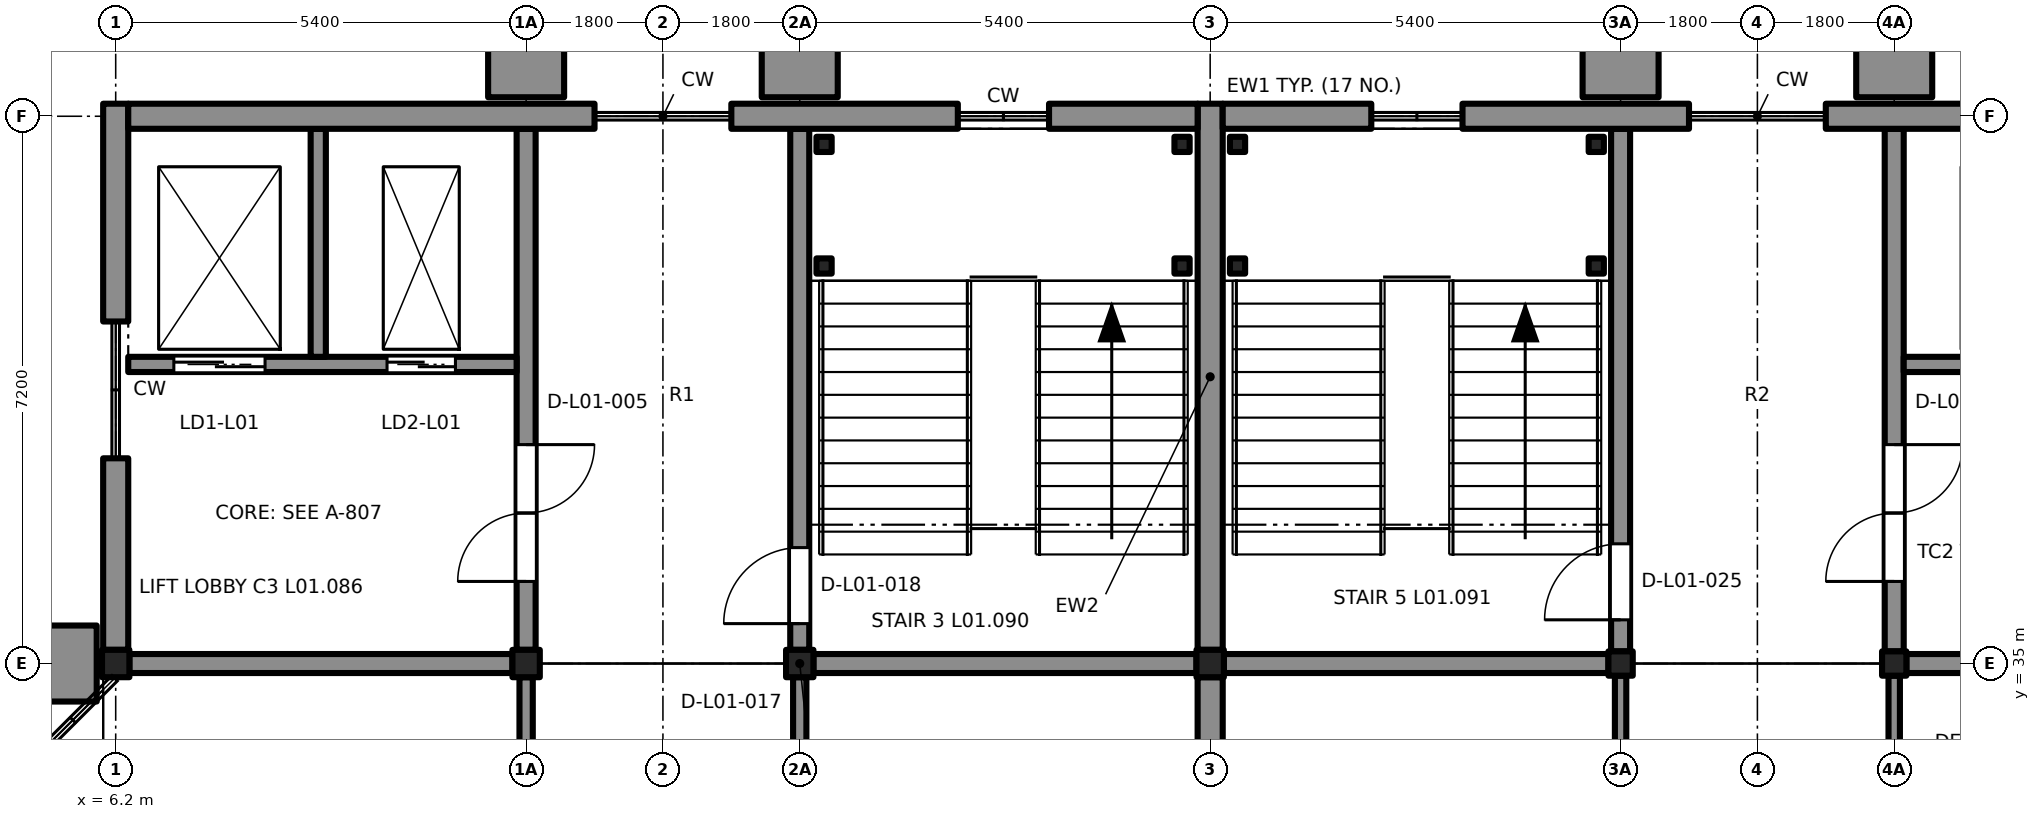
"""IFC4 building model, lengths in metres.
Left out: names, types, materials, properties, quantities, classifications, styles, units other than length and angle.
Written with IfcOpenShell. Run it as: python <this file> out.ifc"""

import sys

from ifc_helpers import new_model, si_unit, direction, frame, frame_2d, origin, origin_2d, place, context, subcontext, project, spatial, rectangle, extrude, element, fill, save


model = new_model("IFC4")
c1 = context("Model", 3, precision=1e-05, world=origin(), true_north=direction((0.0, 1.0)))
c2 = subcontext(c1, "Body", "Model", "MODEL_VIEW")
j1 = project(units=[si_unit("LENGTHUNIT", "METRE"), si_unit("PLANEANGLEUNIT", "RADIAN")], contexts=[c1])
p1 = place(None, origin())
s1 = spatial("IfcSite", under=j1, at=p1, CompositionType="ELEMENT")
p2 = place(p1, origin())
s2 = spatial("IfcBuilding", under=s1, at=p2, CompositionType="ELEMENT")
p3 = place(p2, frame((0.0, 0.0, 6.3)))
s3 = spatial("IfcBuildingStorey", under=s2, at=p3, CompositionType="ELEMENT", Elevation=6.3)
for number, where, z_axis, x_axis in (
    (1, (6.2, 35.0, 0.0), (0.0, 0.0, 1.0), (1.0, 0.0, 0.0)),
    (2, (11.6, 35.0, 0.0), (0.0, 0.0, 1.0), (1.0, 0.0, 0.0)),
    (3, (15.2, 35.0, 0.0), (0.0, 0.0, 1.0), (1.0, 0.0, 0.0)),
    (4, (20.6, 35.0, 0.0), (0.0, 0.0, 1.0), (1.0, 0.0, 0.0)),
):
    element("IfcColumn", number, at=place(p3, frame(where, z_axis=z_axis, x_axis=x_axis)), inside=s3, PredefinedType="COLUMN", context=c2, shape_type="SweptSolid", body=[
        extrude(rectangle(XDim=0.36, YDim=0.36, at=origin_2d()), origin(), (0.0, 0.0, 1.0), 3.9),
    ])
for number, where, z_axis, x_axis in (
    (5, (26.0, 35.0, 0.0), (0.0, 0.0, 1.0), (1.0, 0.0, 0.0)),
    (6, (29.6, 35.0, 0.0), (0.0, 0.0, 1.0), (1.0, 0.0, 0.0)),
):
    element("IfcColumn", number, at=place(p3, frame(where, z_axis=z_axis, x_axis=x_axis)), inside=s3, PredefinedType="COLUMN", context=c2, shape_type="SweptSolid", body=[
        extrude(rectangle(XDim=0.32, YDim=0.32, at=origin_2d()), origin(), (0.0, 0.0, 1.0), 3.9),
    ])
p4 = place(p3, frame((15.2, 35.18, 0.0), z_axis=(0.0, 0.0, 1.0), x_axis=(0.0, 1.0, 0.0)))
e7 = element("IfcWall", 7, at=p4, inside=s3, PredefinedType="SHEAR", context=c2, shape_type="SweptSolid", body=[
    extrude(rectangle(XDim=6.855, YDim=0.25, at=frame_2d((3.427, 0.0))), origin(), (0.0, 0.0, 1.0), 3.65),
])
p5 = place(p4, frame((0.345, 0.0, 0.0)))
e8 = element("IfcOpeningElement", 8, at=p5, cuts=e7, PredefinedType="OPENING", context=c2, shape_type="SweptSolid", body=[
    extrude(rectangle(XDim=1.0, YDim=2.1, at=frame_2d((0.5, 1.05))), frame((0.0, 0.135, 0.0), z_axis=(0.0, -1.0, 0.0), x_axis=(1.0, 0.0, 0.0)), (0.0, 0.0, 1.0), 0.27),
])
p6 = place(p3, frame((15.38, 35.0, 0.0), z_axis=(0.0, 0.0, 1.0), x_axis=(1.0, 0.0, 0.0)))
e9 = element("IfcWall", 9, at=p6, inside=s3, PredefinedType="SHEAR", context=c2, shape_type="SweptSolid", body=[
    extrude(rectangle(XDim=5.04, YDim=0.25, at=frame_2d((2.52, 0.0))), origin(), (0.0, 0.0, 1.0), 3.65),
])
p7 = place(p3, frame((11.6, 35.18, 0.0), z_axis=(0.0, 0.0, 1.0), x_axis=(0.0, 1.0, 0.0)))
e10 = element("IfcWall", 10, at=p7, inside=s3, PredefinedType="SHEAR", context=c2, shape_type="SweptSolid", body=[
    extrude(rectangle(XDim=6.855, YDim=0.25, at=frame_2d((3.427, 0.0))), origin(), (0.0, 0.0, 1.0), 3.65),
])
p8 = place(p7, frame((0.9, 0.0, 0.0)))
e11 = element("IfcOpeningElement", 11, at=p8, cuts=e10, PredefinedType="OPENING", context=c2, shape_type="SweptSolid", body=[
    extrude(rectangle(XDim=1.8, YDim=2.1, at=frame_2d((0.9, 1.05))), frame((0.0, 0.135, 0.0), z_axis=(0.0, -1.0, 0.0), x_axis=(1.0, 0.0, 0.0)), (0.0, 0.0, 1.0), 0.27),
])
p9 = place(p3, frame((6.38, 35.0, 0.0), z_axis=(0.0, 0.0, 1.0), x_axis=(1.0, 0.0, 0.0)))
e12 = element("IfcWall", 12, at=p9, inside=s3, PredefinedType="SHEAR", context=c2, shape_type="SweptSolid", body=[
    extrude(rectangle(XDim=5.04, YDim=0.25, at=frame_2d((2.52, 0.0))), origin(), (0.0, 0.0, 1.0), 3.65),
])
p10 = place(p3, frame((6.365, 38.935, 0.0), z_axis=(0.0, 0.0, 1.0), x_axis=(1.0, 0.0, 0.0)))
e13 = element("IfcWall", 13, at=p10, inside=s3, PredefinedType="SHEAR", context=c2, shape_type="SweptSolid", body=[
    extrude(rectangle(XDim=5.11, YDim=0.2, at=frame_2d((2.555, 0.0))), origin(), (0.0, 0.0, 1.0), 3.65),
])
p11 = place(p10, frame((0.6, 0.0, 0.0)))
e14 = element("IfcOpeningElement", 14, at=p11, cuts=e13, PredefinedType="OPENING", context=c2, shape_type="SweptSolid", body=[
    extrude(rectangle(XDim=1.2, YDim=2.1, at=frame_2d((0.6, 1.05))), frame((0.0, 0.11, 0.0), z_axis=(0.0, -1.0, 0.0), x_axis=(1.0, 0.0, 0.0)), (0.0, 0.0, 1.0), 0.22),
])
p12 = place(p10, frame((3.405, 0.0, 0.0)))
e15 = element("IfcOpeningElement", 15, at=p12, cuts=e13, PredefinedType="OPENING", context=c2, shape_type="SweptSolid", body=[
    extrude(rectangle(XDim=0.9, YDim=2.1, at=frame_2d((0.45, 1.05))), frame((0.0, 0.11, 0.0), z_axis=(0.0, -1.0, 0.0), x_axis=(1.0, 0.0, 0.0)), (0.0, 0.0, 1.0), 0.22),
])
p13 = place(p3, frame((8.865, 42.035, 0.0), z_axis=(0.0, 0.0, 1.0), x_axis=(0.0, -1.0, 0.0)))
e16 = element("IfcWall", 16, at=p13, inside=s3, PredefinedType="SHEAR", context=c2, shape_type="SweptSolid", body=[
    extrude(rectangle(XDim=3.0, YDim=0.2, at=frame_2d((1.5, 0.0))), origin(), (0.0, 0.0, 1.0), 3.65),
])
for number, where, z_axis, x_axis in (
    (17, (15.52, 41.83, 0.0), (0.0, 0.0, 1.0), (1.0, 0.0, 0.0)),
    (18, (20.23, 41.83, 0.0), (0.0, 0.0, 1.0), (1.0, 0.0, 0.0)),
    (19, (15.52, 40.23, 0.0), (0.0, 0.0, 1.0), (1.0, 0.0, 0.0)),
    (20, (20.23, 40.23, 0.0), (0.0, 0.0, 1.0), (1.0, 0.0, 0.0)),
):
    element("IfcColumn", number, at=place(p3, frame(where, z_axis=z_axis, x_axis=x_axis)), inside=s3, PredefinedType="COLUMN", context=c2, shape_type="SweptSolid", body=[
        extrude(rectangle(XDim=0.2, YDim=0.2, at=origin_2d()), origin(), (0.0, 0.0, 1.0), 3.9),
    ])
p14 = place(p3, frame((26.0, 35.16, 0.0), z_axis=(0.0, 0.0, 1.0), x_axis=(0.0, 1.0, 0.0)))
e21 = element("IfcWall", 21, at=p14, inside=s3, PredefinedType="SHEAR", context=c2, shape_type="SweptSolid", body=[
    extrude(rectangle(XDim=6.875, YDim=0.25, at=frame_2d((3.438, 0.0))), origin(), (0.0, 0.0, 1.0), 3.65),
])
p15 = place(p14, frame((0.415, 0.0, 0.0)))
e22 = element("IfcOpeningElement", 22, at=p15, cuts=e21, PredefinedType="OPENING", context=c2, shape_type="SweptSolid", body=[
    extrude(rectangle(XDim=1.0, YDim=2.1, at=frame_2d((0.5, 1.05))), frame((0.0, 0.135, 0.0), z_axis=(0.0, -1.0, 0.0), x_axis=(1.0, 0.0, 0.0)), (0.0, 0.0, 1.0), 0.27),
])
p16 = place(p3, frame((20.78, 35.0, 0.0), z_axis=(0.0, 0.0, 1.0), x_axis=(1.0, 0.0, 0.0)))
e23 = element("IfcWall", 23, at=p16, inside=s3, PredefinedType="SHEAR", context=c2, shape_type="SweptSolid", body=[
    extrude(rectangle(XDim=5.06, YDim=0.25, at=frame_2d((2.53, 0.0))), origin(), (0.0, 0.0, 1.0), 3.65),
])
p17 = place(p3, frame((29.6, 35.16, 0.0), z_axis=(0.0, 0.0, 1.0), x_axis=(0.0, 1.0, 0.0)))
e24 = element("IfcWall", 24, at=p17, inside=s3, PredefinedType="SHEAR", context=c2, shape_type="SweptSolid", body=[
    extrude(rectangle(XDim=6.875, YDim=0.25, at=frame_2d((3.438, 0.0))), origin(), (0.0, 0.0, 1.0), 3.65),
])
p18 = place(p17, frame((0.92, 0.0, 0.0)))
e25 = element("IfcOpeningElement", 25, at=p18, cuts=e24, PredefinedType="OPENING", context=c2, shape_type="SweptSolid", body=[
    extrude(rectangle(XDim=1.8, YDim=2.1, at=frame_2d((0.9, 1.05))), frame((0.0, 0.135, 0.0), z_axis=(0.0, -1.0, 0.0), x_axis=(1.0, 0.0, 0.0)), (0.0, 0.0, 1.0), 0.27),
])
p19 = place(p3, frame((29.76, 35.0, 0.0), z_axis=(0.0, 0.0, 1.0), x_axis=(1.0, 0.0, 0.0)))
e26 = element("IfcWall", 26, at=p19, inside=s3, PredefinedType="SHEAR", context=c2, shape_type="SweptSolid", body=[
    extrude(rectangle(XDim=5.08, YDim=0.25, at=frame_2d((2.54, 0.0))), origin(), (0.0, 0.0, 1.0), 3.65),
])
p20 = place(p3, frame((29.725, 38.935, 0.0), z_axis=(0.0, 0.0, 1.0), x_axis=(1.0, 0.0, 0.0)))
e27 = element("IfcWall", 27, at=p20, inside=s3, PredefinedType="SHEAR", context=c2, shape_type="SweptSolid", body=[
    extrude(rectangle(XDim=5.11, YDim=0.2, at=frame_2d((2.555, 0.0))), origin(), (0.0, 0.0, 1.0), 3.65),
])
p21 = place(p20, frame((3.31, 0.0, 0.0)))
e28 = element("IfcOpeningElement", 28, at=p21, cuts=e27, PredefinedType="OPENING", context=c2, shape_type="SweptSolid", body=[
    extrude(rectangle(XDim=1.2, YDim=2.1, at=frame_2d((0.6, 1.05))), frame((0.0, 0.11, 0.0), z_axis=(0.0, -1.0, 0.0), x_axis=(1.0, 0.0, 0.0)), (0.0, 0.0, 1.0), 0.22),
])
p22 = place(p20, frame((0.805, 0.0, 0.0)))
e29 = element("IfcOpeningElement", 29, at=p22, cuts=e27, PredefinedType="OPENING", context=c2, shape_type="SweptSolid", body=[
    extrude(rectangle(XDim=0.9, YDim=2.1, at=frame_2d((0.45, 1.05))), frame((0.0, 0.11, 0.0), z_axis=(0.0, -1.0, 0.0), x_axis=(1.0, 0.0, 0.0)), (0.0, 0.0, 1.0), 0.22),
])
for number, where, z_axis, x_axis in (
    (30, (20.96, 41.83, 0.0), (0.0, 0.0, 1.0), (1.0, 0.0, 0.0)),
    (31, (25.68, 41.83, 0.0), (0.0, 0.0, 1.0), (1.0, 0.0, 0.0)),
    (32, (20.96, 40.23, 0.0), (0.0, 0.0, 1.0), (1.0, 0.0, 0.0)),
    (33, (25.68, 40.23, 0.0), (0.0, 0.0, 1.0), (1.0, 0.0, 0.0)),
):
    element("IfcColumn", number, at=place(p3, frame(where, z_axis=z_axis, x_axis=x_axis)), inside=s3, PredefinedType="COLUMN", context=c2, shape_type="SweptSolid", body=[
        extrude(rectangle(XDim=0.2, YDim=0.2, at=origin_2d()), origin(), (0.0, 0.0, 1.0), 3.9),
    ])
p23 = place(p3, frame((6.2, 35.18, 0.0), z_axis=(0.0, 0.0, 1.0), x_axis=(0.0, 1.0, 0.0)))
e34 = element("IfcWall", 34, at=p23, inside=s3, PredefinedType="SOLIDWALL", context=c2, shape_type="SweptSolid", body=[
    extrude(rectangle(XDim=2.52, YDim=0.33, at=frame_2d((1.26, 0.0))), origin(), (0.0, 0.0, 1.0), 3.22),
])
p24 = place(p3, frame((6.2, 39.5, 0.0), z_axis=(0.0, 0.0, 1.0), x_axis=(0.0, 1.0, 0.0)))
e35 = element("IfcWall", 35, at=p24, inside=s3, PredefinedType="SOLIDWALL", context=c2, shape_type="SweptSolid", body=[
    extrude(rectangle(XDim=2.865, YDim=0.33, at=frame_2d((1.433, 0.0))), origin(), (0.0, 0.0, 1.0), 3.22),
])
p25 = place(p3, frame((5.575, 34.5, 0.0), z_axis=(0.0, 0.0, 1.0), x_axis=(0.0, 1.0, 0.0)))
e36 = element("IfcWall", 36, at=p25, inside=s3, PredefinedType="SOLIDWALL", context=c2, shape_type="SweptSolid", body=[
    extrude(rectangle(XDim=1.0, YDim=0.75, at=frame_2d((0.5, 0.0))), origin(), (0.0, 0.0, 1.0), 3.9),
])
p26 = place(p3, frame((20.6, 34.82, 0.0), z_axis=(0.0, 0.0, 1.0), x_axis=(0.0, -1.0, 0.0)))
e37 = element("IfcWall", 37, at=p26, inside=s3, PredefinedType="SOLIDWALL", context=c2, shape_type="SweptSolid", body=[
    extrude(rectangle(XDim=6.84, YDim=0.33, at=frame_2d((3.42, 0.0))), origin(), (0.0, 0.0, 1.0), 3.22),
])
p27 = place(p3, frame((20.6, 42.365, 0.0), z_axis=(0.0, 0.0, 1.0), x_axis=(0.0, -1.0, 0.0)))
e38 = element("IfcWall", 38, at=p27, inside=s3, PredefinedType="SOLIDWALL", context=c2, shape_type="SweptSolid", body=[
    extrude(rectangle(XDim=7.185, YDim=0.33, at=frame_2d((3.593, 0.0))), origin(), (0.0, 0.0, 1.0), 3.22),
])
p28 = place(p3, frame((6.365, 42.2, 0.0), z_axis=(0.0, 0.0, 1.0), x_axis=(1.0, 0.0, 0.0)))
e39 = element("IfcWall", 39, at=p28, inside=s3, PredefinedType="SOLIDWALL", context=c2, shape_type="SweptSolid", body=[
    extrude(rectangle(XDim=6.135, YDim=0.33, at=frame_2d((3.067, 0.0))), origin(), (0.0, 0.0, 1.0), 3.2),
])
p29 = place(p3, frame((14.3, 42.2, 0.0), z_axis=(0.0, 0.0, 1.0), x_axis=(1.0, 0.0, 0.0)))
e40 = element("IfcWall", 40, at=p29, inside=s3, PredefinedType="SOLIDWALL", context=c2, shape_type="SweptSolid", body=[
    extrude(rectangle(XDim=2.98, YDim=0.33, at=frame_2d((1.49, 0.0))), origin(), (0.0, 0.0, 1.0), 3.2),
])
p30 = place(p3, frame((18.48, 42.2, 0.0), z_axis=(0.0, 0.0, 1.0), x_axis=(1.0, 0.0, 0.0)))
e41 = element("IfcWall", 41, at=p30, inside=s3, PredefinedType="SOLIDWALL", context=c2, shape_type="SweptSolid", body=[
    extrude(rectangle(XDim=1.955, YDim=0.33, at=frame_2d((0.978, 0.0))), origin(), (0.0, 0.0, 1.0), 3.2),
])
for number, where, z_axis, x_axis in (
    (42, (11.1, 42.825, 0.0), (0.0, 0.0, 1.0), (1.0, 0.0, 0.0)),
    (43, (14.7, 42.825, 0.0), (0.0, 0.0, 1.0), (1.0, 0.0, 0.0)),
):
    element("IfcWall", number, at=place(p3, frame(where, z_axis=z_axis, x_axis=x_axis)), inside=s3, PredefinedType="SOLIDWALL", context=c2, shape_type="SweptSolid", body=[
        extrude(rectangle(XDim=1.0, YDim=0.75, at=frame_2d((0.5, 0.0))), origin(), (0.0, 0.0, 1.0), 3.9),
    ])
p31 = place(p3, frame((20.765, 42.2, 0.0), z_axis=(0.0, 0.0, 1.0), x_axis=(1.0, 0.0, 0.0)))
e44 = element("IfcWall", 44, at=p31, inside=s3, PredefinedType="SOLIDWALL", context=c2, shape_type="SweptSolid", body=[
    extrude(rectangle(XDim=1.955, YDim=0.33, at=frame_2d((0.978, 0.0))), origin(), (0.0, 0.0, 1.0), 3.2),
])
p32 = place(p3, frame((23.92, 42.2, 0.0), z_axis=(0.0, 0.0, 1.0), x_axis=(1.0, 0.0, 0.0)))
e45 = element("IfcWall", 45, at=p32, inside=s3, PredefinedType="SOLIDWALL", context=c2, shape_type="SweptSolid", body=[
    extrude(rectangle(XDim=2.98, YDim=0.33, at=frame_2d((1.49, 0.0))), origin(), (0.0, 0.0, 1.0), 3.2),
])
p33 = place(p3, frame((28.7, 42.2, 0.0), z_axis=(0.0, 0.0, 1.0), x_axis=(1.0, 0.0, 0.0)))
e46 = element("IfcWall", 46, at=p33, inside=s3, PredefinedType="SOLIDWALL", context=c2, shape_type="SweptSolid", body=[
    extrude(rectangle(XDim=6.135, YDim=0.33, at=frame_2d((3.067, 0.0))), origin(), (0.0, 0.0, 1.0), 3.2),
])
for number, where, z_axis, x_axis in (
    (47, (25.5, 42.825, 0.0), (0.0, 0.0, 1.0), (1.0, 0.0, 0.0)),
    (48, (29.1, 42.825, 0.0), (0.0, 0.0, 1.0), (1.0, 0.0, 0.0)),
):
    element("IfcWall", number, at=place(p3, frame(where, z_axis=z_axis, x_axis=x_axis)), inside=s3, PredefinedType="SOLIDWALL", context=c2, shape_type="SweptSolid", body=[
        extrude(rectangle(XDim=1.0, YDim=0.75, at=frame_2d((0.5, 0.0))), origin(), (0.0, 0.0, 1.0), 3.9),
    ])
p34 = place(p3, frame((11.6, 27.98, 0.0), z_axis=(0.0, 0.0, 1.0), x_axis=(0.0, 1.0, 0.0)))
e49 = element("IfcWall", 49, at=p34, inside=s3, PredefinedType="PARTITIONING", context=c2, shape_type="SweptSolid", body=[
    extrude(rectangle(XDim=6.84, YDim=0.175, at=frame_2d((3.42, 0.0))), origin(), (0.0, 0.0, 1.0), 3.22),
])
p35 = place(p34, frame((0.62, 0.0, 0.0)))
e50 = element("IfcOpeningElement", 50, at=p35, cuts=e49, PredefinedType="OPENING", context=c2, shape_type="SweptSolid", body=[
    extrude(rectangle(XDim=2.0, YDim=2.4, at=frame_2d((1.0, 1.2))), frame((0.0, 0.097, 0.0), z_axis=(0.0, -1.0, 0.0), x_axis=(1.0, 0.0, 0.0)), (0.0, 0.0, 1.0), 0.195),
])
p36 = place(p3, frame((15.2, 34.82, 0.0), z_axis=(0.0, 0.0, 1.0), x_axis=(0.0, -1.0, 0.0)))
e51 = element("IfcWall", 51, at=p36, inside=s3, PredefinedType="PARTITIONING", context=c2, shape_type="SweptSolid", body=[
    extrude(rectangle(XDim=3.42, YDim=0.175, at=frame_2d((1.71, 0.0))), origin(), (0.0, 0.0, 1.0), 3.22),
])
p37 = place(p36, frame((0.87, 0.0, 0.0)))
e52 = element("IfcOpeningElement", 52, at=p37, cuts=e51, PredefinedType="OPENING", context=c2, shape_type="SweptSolid", body=[
    extrude(rectangle(XDim=1.5, YDim=2.1, at=frame_2d((0.75, 1.05))), frame((0.0, 0.097, 0.0), z_axis=(0.0, -1.0, 0.0), x_axis=(1.0, 0.0, 0.0)), (0.0, 0.0, 1.0), 0.195),
])
p38 = place(p3, frame((26.0, 31.4, 0.0), z_axis=(0.0, 0.0, 1.0), x_axis=(0.0, 1.0, 0.0)))
e53 = element("IfcWall", 53, at=p38, inside=s3, PredefinedType="PARTITIONING", context=c2, shape_type="SweptSolid", body=[
    extrude(rectangle(XDim=3.44, YDim=0.15, at=frame_2d((1.72, 0.0))), origin(), (0.0, 0.0, 1.0), 3.22),
])
p39 = place(p38, frame((1.3, 0.0, 0.0)))
e54 = element("IfcOpeningElement", 54, at=p39, cuts=e53, PredefinedType="OPENING", context=c2, shape_type="SweptSolid", body=[
    extrude(rectangle(XDim=1.0, YDim=2.1, at=frame_2d((0.5, 1.05))), frame((0.0, 0.085, 0.0), z_axis=(0.0, -1.0, 0.0), x_axis=(1.0, 0.0, 0.0)), (0.0, 0.0, 1.0), 0.17),
])
p40 = place(p3, frame((29.6, 34.84, 0.0), z_axis=(0.0, 0.0, 1.0), x_axis=(0.0, -1.0, 0.0)))
e55 = element("IfcWall", 55, at=p40, inside=s3, PredefinedType="PARTITIONING", context=c2, shape_type="SweptSolid", body=[
    extrude(rectangle(XDim=3.44, YDim=0.15, at=frame_2d((1.72, 0.0))), origin(), (0.0, 0.0, 1.0), 3.22),
])
p41 = place(p40, frame((1.14, 0.0, 0.0)))
e56 = element("IfcOpeningElement", 56, at=p41, cuts=e55, PredefinedType="OPENING", context=c2, shape_type="SweptSolid", body=[
    extrude(rectangle(XDim=1.0, YDim=2.1, at=frame_2d((0.5, 1.05))), frame((0.0, 0.085, 0.0), z_axis=(0.0, -1.0, 0.0), x_axis=(1.0, 0.0, 0.0)), (0.0, 0.0, 1.0), 0.17),
])
p42 = place(p5, origin())
e57 = element("IfcDoor", 57, at=p42, inside=s3, OperationType="SINGLE_SWING_LEFT", PredefinedType="DOOR", context=c2, shape_type="SweptSolid", body=[
    extrude(rectangle(XDim=1.0, YDim=2.1, at=frame_2d((0.5, 1.05))), frame((0.0, 0.025, 0.0), z_axis=(0.0, -1.0, 0.0), x_axis=(1.0, 0.0, 0.0)), (0.0, 0.0, 1.0), 0.05),
])
fill(e8, e57)
p43 = place(p8, origin())
e58 = element("IfcDoor", 58, at=p43, inside=s3, OperationType="DOUBLE_DOOR_SINGLE_SWING", PredefinedType="DOOR", context=c2, shape_type="SweptSolid", body=[
    extrude(rectangle(XDim=1.8, YDim=2.1, at=frame_2d((0.9, 1.05))), frame((0.0, 0.025, 0.0), z_axis=(0.0, -1.0, 0.0), x_axis=(1.0, 0.0, 0.0)), (0.0, 0.0, 1.0), 0.05),
])
fill(e11, e58)
p44 = place(p11, origin())
e59 = element("IfcDoor", 59, at=p44, inside=s3, OperationType="DOUBLE_DOOR_SLIDING", PredefinedType="DOOR", context=c2, shape_type="SweptSolid", body=[
    extrude(rectangle(XDim=1.2, YDim=2.1, at=frame_2d((0.6, 1.05))), frame((0.0, 0.025, 0.0), z_axis=(0.0, -1.0, 0.0), x_axis=(1.0, 0.0, 0.0)), (0.0, 0.0, 1.0), 0.05),
])
fill(e14, e59)
p45 = place(p12, origin())
e60 = element("IfcDoor", 60, at=p45, inside=s3, OperationType="DOUBLE_DOOR_SLIDING", PredefinedType="DOOR", context=c2, shape_type="SweptSolid", body=[
    extrude(rectangle(XDim=0.9, YDim=2.1, at=frame_2d((0.45, 1.05))), frame((0.0, 0.025, 0.0), z_axis=(0.0, -1.0, 0.0), x_axis=(1.0, 0.0, 0.0)), (0.0, 0.0, 1.0), 0.05),
])
fill(e15, e60)
p46 = place(p15, origin())
e61 = element("IfcDoor", 61, at=p46, inside=s3, OperationType="SINGLE_SWING_LEFT", PredefinedType="DOOR", context=c2, shape_type="SweptSolid", body=[
    extrude(rectangle(XDim=1.0, YDim=2.1, at=frame_2d((0.5, 1.05))), frame((0.0, 0.025, 0.0), z_axis=(0.0, -1.0, 0.0), x_axis=(1.0, 0.0, 0.0)), (0.0, 0.0, 1.0), 0.05),
])
fill(e22, e61)
p47 = place(p18, origin())
e62 = element("IfcDoor", 62, at=p47, inside=s3, OperationType="DOUBLE_DOOR_SINGLE_SWING", PredefinedType="DOOR", context=c2, shape_type="SweptSolid", body=[
    extrude(rectangle(XDim=1.8, YDim=2.1, at=frame_2d((0.9, 1.05))), frame((0.0, 0.025, 0.0), z_axis=(0.0, -1.0, 0.0), x_axis=(1.0, 0.0, 0.0)), (0.0, 0.0, 1.0), 0.05),
])
fill(e25, e62)
save(model, sys.argv[1])
